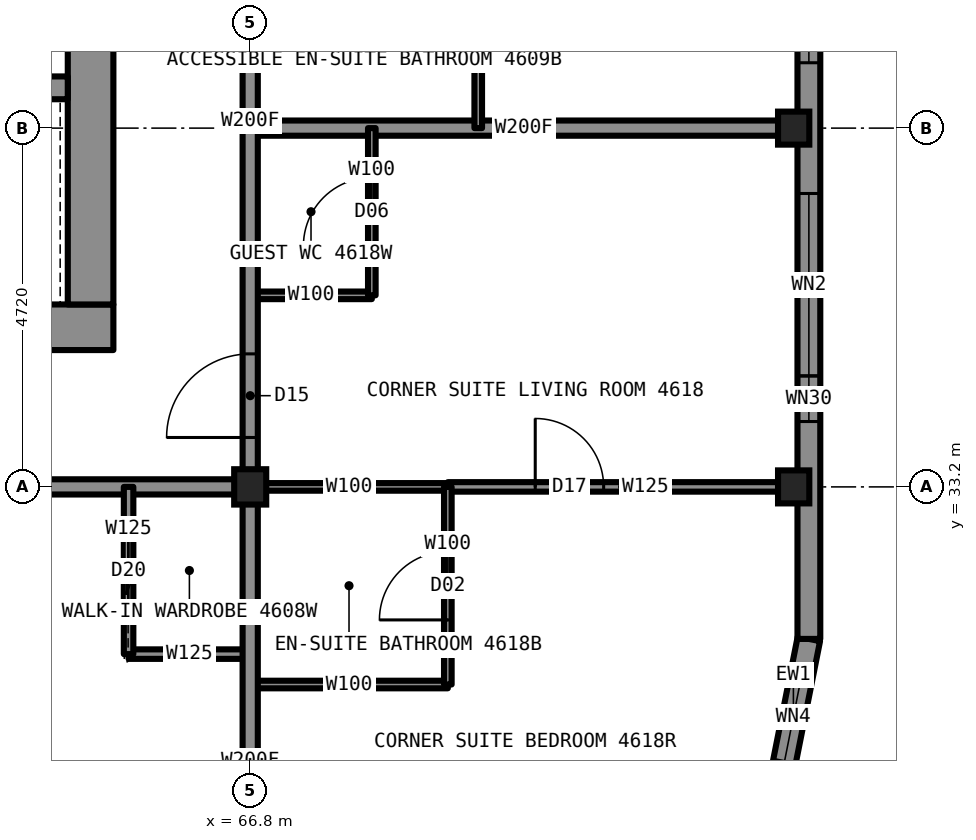
"""IFC4 building model, lengths in metres.
Left out: names, types, materials, properties, quantities, classifications, styles, units other than length and angle.
Written with IfcOpenShell. Run it as: python <this file> out.ifc"""

import sys

from ifc_helpers import new_model, si_unit, direction, frame, frame_2d, origin, origin_2d, place, context, subcontext, project, spatial, rectangle, i_section, extrude, element, fill, save


model = new_model("IFC4")
c1 = context("Model", 3, precision=1e-05, world=origin(), true_north=direction((0.0, 1.0)))
c2 = subcontext(c1, "Body", "Model", "MODEL_VIEW")
j1 = project(units=[si_unit("LENGTHUNIT", "METRE"), si_unit("PLANEANGLEUNIT", "RADIAN")], contexts=[c1])
p1 = place(None, origin())
s1 = spatial("IfcSite", under=j1, at=p1, CompositionType="ELEMENT")
p2 = place(p1, origin())
s2 = spatial("IfcBuilding", under=s1, at=p2, CompositionType="ELEMENT")
p3 = place(p2, frame((0.0, 0.0, 172.3)))
s3 = spatial("IfcBuildingStorey", under=s2, at=p3, CompositionType="ELEMENT", Elevation=172.3)
for number, where, z_axis, x_axis in (
    (1, (73.95, 33.2, 0.0), (0.0, 0.0, 1.0), (1.0, 0.0, 0.0)),
    (2, (73.95, 37.92, 0.0), (0.0, 0.0, 1.0), (1.0, 0.0, 0.0)),
):
    element("IfcColumn", number, at=place(p3, frame(where, z_axis=z_axis, x_axis=x_axis)), inside=s3, PredefinedType="COLUMN", context=c2, shape_type="SweptSolid", body=[
        extrude(i_section(OverallWidth=0.411, OverallDepth=0.434, WebThickness=0.036, FlangeThickness=0.057, at=origin_2d()), origin(), (0.0, 0.0, 1.0), 3.5),
    ])
p4 = place(p3, frame((66.8, 33.2, 0.0), z_axis=(0.0, 0.0, 1.0), x_axis=(1.0, 0.0, 0.0)))
e3 = element("IfcColumn", 3, at=p4, inside=s3, PredefinedType="COLUMN", context=c2, shape_type="SweptSolid", body=[
    extrude(i_section(OverallWidth=0.422, OverallDepth=0.465, WebThickness=0.045, FlangeThickness=0.073, at=origin_2d()), origin(), (0.0, 0.0, 1.0), 3.5),
])
p5 = place(p3, frame((45.0, 35.3, 0.0), z_axis=(0.0, 0.0, 1.0), x_axis=(1.0, 0.0, 0.0)))
e4 = element("IfcWall", 4, at=p5, inside=s3, PredefinedType="SHEAR", context=c2, shape_type="SweptSolid", body=[
    extrude(rectangle(XDim=20.0, YDim=0.6, at=frame_2d((10.0, 0.0))), origin(), (0.0, 0.0, 1.0), 3.5),
])
p6 = place(p3, frame((64.7, 35.6, 0.0), z_axis=(0.0, 0.0, 1.0), x_axis=(0.0, 1.0, 0.0)))
e5 = element("IfcWall", 5, at=p6, inside=s3, PredefinedType="SHEAR", context=c2, shape_type="SweptSolid", body=[
    extrude(rectangle(XDim=18.8, YDim=0.6, at=frame_2d((9.4, 0.0))), origin(), (0.0, 0.0, 1.0), 3.5),
])
p7 = place(p6, frame((13.4, 0.0, 0.0)))
e6 = element("IfcOpeningElement", 6, at=p7, cuts=e5, PredefinedType="OPENING", context=c2, shape_type="SweptSolid", body=[
    extrude(rectangle(XDim=1.8, YDim=2.2, at=frame_2d((0.9, 1.1))), frame((0.0, 0.31, 0.0), z_axis=(0.0, -1.0, 0.0), x_axis=(1.0, 0.0, 0.0)), (0.0, 0.0, 1.0), 0.62),
])
p8 = place(p6, frame((3.6, 0.0, 0.0)))
e7 = element("IfcOpeningElement", 7, at=p8, cuts=e5, PredefinedType="OPENING", context=c2, shape_type="SweptSolid", body=[
    extrude(rectangle(XDim=1.8, YDim=2.2, at=frame_2d((0.9, 1.1))), frame((0.0, 0.31, 0.0), z_axis=(0.0, -1.0, 0.0), x_axis=(1.0, 0.0, 0.0)), (0.0, 0.0, 1.0), 0.62),
])
p9 = place(p3, frame((45.6, 38.45, 0.0), z_axis=(0.0, 0.0, 1.0), x_axis=(1.0, 0.0, 0.0)))
e8 = element("IfcWall", 8, at=p9, inside=s3, PredefinedType="SHEAR", context=c2, shape_type="SweptSolid", body=[
    extrude(rectangle(XDim=18.8, YDim=0.3, at=frame_2d((9.4, 0.0))), origin(), (0.0, 0.0, 1.0), 3.5),
])
p10 = place(p9, frame((0.7, 0.0, 0.0)))
e9 = element("IfcOpeningElement", 9, at=p10, cuts=e8, PredefinedType="OPENING", context=c2, shape_type="SweptSolid", body=[
    extrude(rectangle(XDim=1.1, YDim=2.2, at=frame_2d((0.55, 1.1))), frame((0.0, 0.16, 0.0), z_axis=(0.0, -1.0, 0.0), x_axis=(1.0, 0.0, 0.0)), (0.0, 0.0, 1.0), 0.32),
])
p11 = place(p9, frame((3.4, 0.0, 0.0)))
e10 = element("IfcOpeningElement", 10, at=p11, cuts=e8, PredefinedType="OPENING", context=c2, shape_type="SweptSolid", body=[
    extrude(rectangle(XDim=1.1, YDim=2.2, at=frame_2d((0.55, 1.1))), frame((0.0, 0.16, 0.0), z_axis=(0.0, -1.0, 0.0), x_axis=(1.0, 0.0, 0.0)), (0.0, 0.0, 1.0), 0.32),
])
p12 = place(p9, frame((6.1, 0.0, 0.0)))
e11 = element("IfcOpeningElement", 11, at=p12, cuts=e8, PredefinedType="OPENING", context=c2, shape_type="SweptSolid", body=[
    extrude(rectangle(XDim=1.1, YDim=2.2, at=frame_2d((0.55, 1.1))), frame((0.0, 0.16, 0.0), z_axis=(0.0, -1.0, 0.0), x_axis=(1.0, 0.0, 0.0)), (0.0, 0.0, 1.0), 0.32),
])
p13 = place(p9, frame((8.8, 0.0, 0.0)))
e12 = element("IfcOpeningElement", 12, at=p13, cuts=e8, PredefinedType="OPENING", context=c2, shape_type="SweptSolid", body=[
    extrude(rectangle(XDim=1.1, YDim=2.2, at=frame_2d((0.55, 1.1))), frame((0.0, 0.16, 0.0), z_axis=(0.0, -1.0, 0.0), x_axis=(1.0, 0.0, 0.0)), (0.0, 0.0, 1.0), 0.32),
])
p14 = place(p3, frame((66.8, 33.2, 0.0), z_axis=(0.0, 0.0, 1.0), x_axis=(1.0, 0.0, 0.0)))
e13 = element("IfcWall", 13, at=p14, inside=s3, PredefinedType="PARTITIONING", context=c2, shape_type="SweptSolid", body=[
    extrude(rectangle(XDim=2.6, YDim=0.1, at=frame_2d((1.3, 0.0))), origin(), (0.0, 0.0, 1.0), 2.573),
])
p15 = place(p3, frame((43.2, 33.2, 0.0), z_axis=(0.0, 0.0, 1.0), x_axis=(1.0, 0.0, 0.0)))
e14 = element("IfcWall", 14, at=p15, inside=s3, PredefinedType="PARTITIONING", context=c2, shape_type="SweptSolid", body=[
    extrude(rectangle(XDim=23.6, YDim=0.2, at=frame_2d((11.8, 0.0))), origin(), (0.0, 0.0, 1.0), 3.33),
])
p16 = place(p15, frame((1.46, 0.0, 0.0)))
e15 = element("IfcOpeningElement", 15, at=p16, cuts=e14, PredefinedType="OPENING", context=c2, shape_type="SweptSolid", body=[
    extrude(rectangle(XDim=1.0, YDim=2.2, at=frame_2d((0.5, 1.1))), frame((0.0, 0.11, 0.0), z_axis=(0.0, -1.0, 0.0), x_axis=(1.0, 0.0, 0.0)), (0.0, 0.0, 1.0), 0.22),
])
p17 = place(p15, frame((7.72, 0.0, 0.0)))
e16 = element("IfcOpeningElement", 16, at=p17, cuts=e14, PredefinedType="OPENING", context=c2, shape_type="SweptSolid", body=[
    extrude(rectangle(XDim=1.0, YDim=2.2, at=frame_2d((0.5, 1.1))), frame((0.0, 0.11, 0.0), z_axis=(0.0, -1.0, 0.0), x_axis=(1.0, 0.0, 0.0)), (0.0, 0.0, 1.0), 0.22),
])
p18 = place(p15, frame((17.16, 0.0, 0.0)))
e17 = element("IfcOpeningElement", 17, at=p18, cuts=e14, PredefinedType="OPENING", context=c2, shape_type="SweptSolid", body=[
    extrude(rectangle(XDim=1.0, YDim=2.2, at=frame_2d((0.5, 1.1))), frame((0.0, 0.11, 0.0), z_axis=(0.0, -1.0, 0.0), x_axis=(1.0, 0.0, 0.0)), (0.0, 0.0, 1.0), 0.22),
])
p19 = place(p3, frame((69.4, 33.2, 0.0), z_axis=(0.0, 0.0, 1.0), x_axis=(1.0, 0.0, 0.0)))
e18 = element("IfcWall", 18, at=p19, inside=s3, PredefinedType="PARTITIONING", context=c2, shape_type="SweptSolid", body=[
    extrude(rectangle(XDim=4.6, YDim=0.125, at=frame_2d((2.3, 0.0))), origin(), (0.0, 0.0, 1.0), 2.573),
])
p20 = place(p19, frame((1.15, 0.0, 0.0)))
e19 = element("IfcOpeningElement", 19, at=p20, cuts=e18, PredefinedType="OPENING", context=c2, shape_type="SweptSolid", body=[
    extrude(rectangle(XDim=0.9, YDim=2.2, at=frame_2d((0.45, 1.1))), frame((0.0, 0.073, 0.0), z_axis=(0.0, -1.0, 0.0), x_axis=(1.0, 0.0, 0.0)), (0.0, 0.0, 1.0), 0.145),
])
p21 = place(p3, frame((65.2, 31.0, 0.0), z_axis=(0.0, 0.0, 1.0), x_axis=(1.0, 0.0, 0.0)))
e20 = element("IfcWall", 20, at=p21, inside=s3, PredefinedType="PARTITIONING", context=c2, shape_type="SweptSolid", body=[
    extrude(rectangle(XDim=1.6, YDim=0.125, at=frame_2d((0.8, 0.0))), origin(), (0.0, 0.0, 1.0), 3.33),
])
p22 = place(p3, frame((66.8, 30.6, 0.0), z_axis=(0.0, 0.0, 1.0), x_axis=(1.0, 0.0, 0.0)))
e21 = element("IfcWall", 21, at=p22, inside=s3, PredefinedType="PARTITIONING", context=c2, shape_type="SweptSolid", body=[
    extrude(rectangle(XDim=2.6, YDim=0.1, at=frame_2d((1.3, 0.0))), origin(), (0.0, 0.0, 1.0), 3.33),
])
p23 = place(p3, frame((66.8, 37.92, 0.0), z_axis=(0.0, 0.0, 1.0), x_axis=(1.0, 0.0, 0.0)))
e22 = element("IfcWall", 22, at=p23, inside=s3, PredefinedType="PARTITIONING", context=c2, shape_type="SweptSolid", body=[
    extrude(rectangle(XDim=7.2, YDim=0.2, at=frame_2d((3.6, 0.0))), origin(), (0.0, 0.0, 1.0), 2.573),
])
p24 = place(p3, frame((66.8, 35.72, 0.0), z_axis=(0.0, 0.0, 1.0), x_axis=(1.0, 0.0, 0.0)))
e23 = element("IfcWall", 23, at=p24, inside=s3, PredefinedType="PARTITIONING", context=c2, shape_type="SweptSolid", body=[
    extrude(rectangle(XDim=1.6, YDim=0.1, at=frame_2d((0.8, 0.0))), origin(), (0.0, 0.0, 1.0), 3.33),
])
p25 = place(p3, frame((65.2, 31.0, 0.0), z_axis=(0.0, 0.0, 1.0), x_axis=(0.0, 1.0, 0.0)))
e24 = element("IfcWall", 24, at=p25, inside=s3, PredefinedType="PARTITIONING", context=c2, shape_type="SweptSolid", body=[
    extrude(rectangle(XDim=2.2, YDim=0.125, at=frame_2d((1.1, 0.0))), origin(), (0.0, 0.0, 1.0), 3.33),
])
p26 = place(p25, frame((0.7, 0.0, 0.0)))
e25 = element("IfcOpeningElement", 25, at=p26, cuts=e24, PredefinedType="OPENING", context=c2, shape_type="SweptSolid", body=[
    extrude(rectangle(XDim=0.8, YDim=2.1, at=frame_2d((0.4, 1.05))), frame((0.0, 0.073, 0.0), z_axis=(0.0, -1.0, 0.0), x_axis=(1.0, 0.0, 0.0)), (0.0, 0.0, 1.0), 0.145),
])
p27 = place(p3, frame((66.8, 33.2, 0.0), z_axis=(0.0, 0.0, 1.0), x_axis=(0.0, 1.0, 0.0)))
e26 = element("IfcWall", 26, at=p27, inside=s3, PredefinedType="PARTITIONING", context=c2, shape_type="SweptSolid", body=[
    extrude(rectangle(XDim=23.58, YDim=0.2, at=frame_2d((11.79, 0.0))), origin(), (0.0, 0.0, 1.0), 3.33),
])
p28 = place(p27, frame((7.87, 0.0, 0.0)))
e27 = element("IfcOpeningElement", 27, at=p28, cuts=e26, PredefinedType="OPENING", context=c2, shape_type="SweptSolid", body=[
    extrude(rectangle(XDim=1.0, YDim=2.2, at=frame_2d((0.5, 1.1))), frame((0.0, 0.11, 0.0), z_axis=(0.0, -1.0, 0.0), x_axis=(1.0, 0.0, 0.0)), (0.0, 0.0, 1.0), 0.22),
])
p29 = place(p27, frame((10.9, 0.0, 0.0)))
e28 = element("IfcOpeningElement", 28, at=p29, cuts=e26, PredefinedType="OPENING", context=c2, shape_type="SweptSolid", body=[
    extrude(rectangle(XDim=1.0, YDim=2.2, at=frame_2d((0.5, 1.1))), frame((0.0, 0.11, 0.0), z_axis=(0.0, -1.0, 0.0), x_axis=(1.0, 0.0, 0.0)), (0.0, 0.0, 1.0), 0.22),
])
p30 = place(p27, frame((16.42, 0.0, 0.0)))
e29 = element("IfcOpeningElement", 29, at=p30, cuts=e26, PredefinedType="OPENING", context=c2, shape_type="SweptSolid", body=[
    extrude(rectangle(XDim=1.0, YDim=2.2, at=frame_2d((0.5, 1.1))), frame((0.0, 0.11, 0.0), z_axis=(0.0, -1.0, 0.0), x_axis=(1.0, 0.0, 0.0)), (0.0, 0.0, 1.0), 0.22),
])
p31 = place(p27, frame((22.05, 0.0, 0.0)))
e30 = element("IfcOpeningElement", 30, at=p31, cuts=e26, PredefinedType="OPENING", context=c2, shape_type="SweptSolid", body=[
    extrude(rectangle(XDim=1.1, YDim=2.2, at=frame_2d((0.55, 1.1))), frame((0.0, 0.11, 0.0), z_axis=(0.0, -1.0, 0.0), x_axis=(1.0, 0.0, 0.0)), (0.0, 0.0, 1.0), 0.22),
])
p32 = place(p27, frame((0.65, 0.0, 0.0)))
e31 = element("IfcOpeningElement", 31, at=p32, cuts=e26, PredefinedType="OPENING", context=c2, shape_type="SweptSolid", body=[
    extrude(rectangle(XDim=1.1, YDim=2.2, at=frame_2d((0.55, 1.1))), frame((0.0, 0.11, 0.0), z_axis=(0.0, -1.0, 0.0), x_axis=(1.0, 0.0, 0.0)), (0.0, 0.0, 1.0), 0.22),
])
p33 = place(p3, frame((66.8, 26.0, 0.0), z_axis=(0.0, 0.0, 1.0), x_axis=(0.0, 1.0, 0.0)))
e32 = element("IfcWall", 32, at=p33, inside=s3, PredefinedType="PARTITIONING", context=c2, shape_type="SweptSolid", body=[
    extrude(rectangle(XDim=7.2, YDim=0.2, at=frame_2d((3.6, 0.0))), origin(), (0.0, 0.0, 1.0), 2.573),
])
p34 = place(p3, frame((68.4, 35.72, 0.0), z_axis=(0.0, 0.0, 1.0), x_axis=(0.0, 1.0, 0.0)))
e33 = element("IfcWall", 33, at=p34, inside=s3, PredefinedType="PARTITIONING", context=c2, shape_type="SweptSolid", body=[
    extrude(rectangle(XDim=2.2, YDim=0.1, at=frame_2d((1.1, 0.0))), origin(), (0.0, 0.0, 1.0), 3.33),
])
p35 = place(p34, frame((0.65, 0.0, 0.0)))
e34 = element("IfcOpeningElement", 34, at=p35, cuts=e33, PredefinedType="OPENING", context=c2, shape_type="SweptSolid", body=[
    extrude(rectangle(XDim=0.9, YDim=2.1, at=frame_2d((0.45, 1.05))), frame((0.0, 0.06, 0.0), z_axis=(0.0, -1.0, 0.0), x_axis=(1.0, 0.0, 0.0)), (0.0, 0.0, 1.0), 0.12),
])
p36 = place(p3, frame((69.4, 30.6, 0.0), z_axis=(0.0, 0.0, 1.0), x_axis=(0.0, 1.0, 0.0)))
e35 = element("IfcWall", 35, at=p36, inside=s3, PredefinedType="PARTITIONING", context=c2, shape_type="SweptSolid", body=[
    extrude(rectangle(XDim=2.6, YDim=0.1, at=frame_2d((1.3, 0.0))), origin(), (0.0, 0.0, 1.0), 3.33),
])
p37 = place(p36, frame((0.85, 0.0, 0.0)))
e36 = element("IfcOpeningElement", 36, at=p37, cuts=e35, PredefinedType="OPENING", context=c2, shape_type="SweptSolid", body=[
    extrude(rectangle(XDim=0.9, YDim=2.1, at=frame_2d((0.45, 1.05))), frame((0.0, 0.06, 0.0), z_axis=(0.0, -1.0, 0.0), x_axis=(1.0, 0.0, 0.0)), (0.0, 0.0, 1.0), 0.12),
])
p38 = place(p3, frame((69.8, 37.92, 0.0), z_axis=(0.0, 0.0, 1.0), x_axis=(0.0, 1.0, 0.0)))
e37 = element("IfcWall", 37, at=p38, inside=s3, PredefinedType="PARTITIONING", context=c2, shape_type="SweptSolid", body=[
    extrude(rectangle(XDim=2.9, YDim=0.1, at=frame_2d((1.45, 0.0))), origin(), (0.0, 0.0, 1.0), 3.33),
])
p39 = place(p3, frame((73.743, 29.153, 0.0), z_axis=(0.0, 0.0, 1.0), x_axis=(0.195081421501, 0.980787050784, 0.0)))
e38 = element("IfcWall", 38, at=p39, inside=s3, PredefinedType="SOLIDWALL", context=c2, shape_type="SweptSolid", body=[
    extrude(rectangle(XDim=2.087, YDim=0.3, at=frame_2d((1.044, 0.0))), origin(), (0.0, 0.0, 1.0), 3.33),
])
p40 = place(p39, frame((0.444, 0.0, 0.3)))
e39 = element("IfcOpeningElement", 39, at=p40, cuts=e38, PredefinedType="OPENING", context=c2, shape_type="SweptSolid", body=[
    extrude(rectangle(XDim=1.2, YDim=2.0, at=frame_2d((0.6, 1.0))), frame((0.0, 0.16, 0.0), z_axis=(0.0, -1.0, 0.0), x_axis=(1.0, 0.0, 0.0)), (0.0, 0.0, 1.0), 0.32),
])
p41 = place(p3, frame((74.15, 31.2, 0.0), z_axis=(0.0, 0.0, 1.0), x_axis=(0.0, 1.0, 0.0)))
e40 = element("IfcWall", 40, at=p41, inside=s3, PredefinedType="SOLIDWALL", context=c2, shape_type="SweptSolid", body=[
    extrude(rectangle(XDim=27.6, YDim=0.3, at=frame_2d((13.8, 0.0))), origin(), (0.0, 0.0, 1.0), 2.83),
])
p42 = place(p41, frame((3.46, 0.0, 0.3)))
e41 = element("IfcOpeningElement", 41, at=p42, cuts=e40, PredefinedType="OPENING", context=c2, shape_type="SweptSolid", body=[
    extrude(rectangle(XDim=2.4, YDim=2.0, at=frame_2d((1.2, 1.0))), frame((0.0, 0.16, 0.0), z_axis=(0.0, -1.0, 0.0), x_axis=(1.0, 0.0, 0.0)), (0.0, 0.0, 1.0), 0.32),
])
p43 = place(p41, frame((7.58, 0.0, 0.3)))
e42 = element("IfcOpeningElement", 42, at=p43, cuts=e40, PredefinedType="OPENING", context=c2, shape_type="SweptSolid", body=[
    extrude(rectangle(XDim=3.0, YDim=2.0, at=frame_2d((1.5, 1.0))), frame((0.0, 0.16, 0.0), z_axis=(0.0, -1.0, 0.0), x_axis=(1.0, 0.0, 0.0)), (0.0, 0.0, 1.0), 0.32),
])
p44 = place(p41, frame((12.3, 0.0, 0.3)))
e43 = element("IfcOpeningElement", 43, at=p44, cuts=e40, PredefinedType="OPENING", context=c2, shape_type="SweptSolid", body=[
    extrude(rectangle(XDim=3.0, YDim=2.0, at=frame_2d((1.5, 1.0))), frame((0.0, 0.16, 0.0), z_axis=(0.0, -1.0, 0.0), x_axis=(1.0, 0.0, 0.0)), (0.0, 0.0, 1.0), 0.32),
])
p45 = place(p41, frame((17.02, 0.0, 0.3)))
e44 = element("IfcOpeningElement", 44, at=p45, cuts=e40, PredefinedType="OPENING", context=c2, shape_type="SweptSolid", body=[
    extrude(rectangle(XDim=3.0, YDim=2.0, at=frame_2d((1.5, 1.0))), frame((0.0, 0.16, 0.0), z_axis=(0.0, -1.0, 0.0), x_axis=(1.0, 0.0, 0.0)), (0.0, 0.0, 1.0), 0.32),
])
p46 = place(p41, frame((21.74, 0.0, 0.3)))
e45 = element("IfcOpeningElement", 45, at=p46, cuts=e40, PredefinedType="OPENING", context=c2, shape_type="SweptSolid", body=[
    extrude(rectangle(XDim=2.4, YDim=2.0, at=frame_2d((1.2, 1.0))), frame((0.0, 0.16, 0.0), z_axis=(0.0, -1.0, 0.0), x_axis=(1.0, 0.0, 0.0)), (0.0, 0.0, 1.0), 0.32),
])
p47 = place(p41, frame((2.86, 0.0, 0.3)))
e46 = element("IfcOpeningElement", 46, at=p47, cuts=e40, PredefinedType="OPENING", context=c2, shape_type="SweptSolid", body=[
    extrude(rectangle(XDim=0.6, YDim=1.1, at=frame_2d((0.3, 0.55))), frame((0.0, 0.16, 0.0), z_axis=(0.0, -1.0, 0.0), x_axis=(1.0, 0.0, 0.0)), (0.0, 0.0, 1.0), 0.32),
])
p48 = place(p41, frame((24.14, 0.0, 0.3)))
e47 = element("IfcOpeningElement", 47, at=p48, cuts=e40, PredefinedType="OPENING", context=c2, shape_type="SweptSolid", body=[
    extrude(rectangle(XDim=0.6, YDim=1.1, at=frame_2d((0.3, 0.55))), frame((0.0, 0.16, 0.0), z_axis=(0.0, -1.0, 0.0), x_axis=(1.0, 0.0, 0.0)), (0.0, 0.0, 1.0), 0.32),
])
p49 = place(p26, origin())
e48 = element("IfcDoor", 48, at=p49, inside=s3, OperationType="SLIDING_TO_LEFT", PredefinedType="DOOR", context=c2, shape_type="SweptSolid", body=[
    extrude(rectangle(XDim=0.8, YDim=2.1, at=frame_2d((0.4, 1.05))), frame((0.0, 0.025, 0.0), z_axis=(0.0, -1.0, 0.0), x_axis=(1.0, 0.0, 0.0)), (0.0, 0.0, 1.0), 0.05),
])
fill(e25, e48)
p50 = place(p32, origin())
e49 = element("IfcDoor", 49, at=p50, inside=s3, OperationType="SINGLE_SWING_LEFT", PredefinedType="DOOR", context=c2, shape_type="SweptSolid", body=[
    extrude(rectangle(XDim=1.1, YDim=2.2, at=frame_2d((0.55, 1.1))), frame((0.0, 0.025, 0.0), z_axis=(0.0, -1.0, 0.0), x_axis=(1.0, 0.0, 0.0)), (0.0, 0.0, 1.0), 0.05),
])
fill(e31, e49)
p51 = place(p37, origin())
e50 = element("IfcDoor", 50, at=p51, inside=s3, OperationType="SINGLE_SWING_RIGHT", PredefinedType="DOOR", context=c2, shape_type="SweptSolid", body=[
    extrude(rectangle(XDim=0.9, YDim=2.1, at=frame_2d((0.45, 1.05))), frame((0.0, 0.025, 0.0), z_axis=(0.0, -1.0, 0.0), x_axis=(1.0, 0.0, 0.0)), (0.0, 0.0, 1.0), 0.05),
])
fill(e36, e50)
p52 = place(p20, origin())
e51 = element("IfcDoor", 51, at=p52, inside=s3, OperationType="SINGLE_SWING_LEFT", PredefinedType="DOOR", context=c2, shape_type="SweptSolid", body=[
    extrude(rectangle(XDim=0.9, YDim=2.2, at=frame_2d((0.45, 1.1))), frame((0.0, 0.025, 0.0), z_axis=(0.0, -1.0, 0.0), x_axis=(1.0, 0.0, 0.0)), (0.0, 0.0, 1.0), 0.05),
])
fill(e19, e51)
p53 = place(p35, origin())
e52 = element("IfcDoor", 52, at=p53, inside=s3, OperationType="SINGLE_SWING_LEFT", PredefinedType="DOOR", context=c2, shape_type="SweptSolid", body=[
    extrude(rectangle(XDim=0.9, YDim=2.1, at=frame_2d((0.45, 1.05))), frame((0.0, 0.025, 0.0), z_axis=(0.0, -1.0, 0.0), x_axis=(1.0, 0.0, 0.0)), (0.0, 0.0, 1.0), 0.05),
])
fill(e34, e52)
p54 = place(p40, origin())
e53 = element("IfcWindow", 53, at=p54, inside=s3, PartitioningType="SINGLE_PANEL", PredefinedType="WINDOW", context=c2, shape_type="SweptSolid", body=[
    extrude(rectangle(XDim=1.2, YDim=2.0, at=frame_2d((0.6, 1.0))), frame((0.0, 0.13, 0.0), z_axis=(0.0, -1.0, 0.0), x_axis=(1.0, 0.0, 0.0)), (0.0, 0.0, 1.0), 0.06),
])
fill(e39, e53)
p55 = place(p42, origin())
e54 = element("IfcWindow", 54, at=p55, inside=s3, PartitioningType="SINGLE_PANEL", PredefinedType="WINDOW", context=c2, shape_type="SweptSolid", body=[
    extrude(rectangle(XDim=2.4, YDim=2.0, at=frame_2d((1.2, 1.0))), frame((0.0, 0.13, 0.0), z_axis=(0.0, -1.0, 0.0), x_axis=(1.0, 0.0, 0.0)), (0.0, 0.0, 1.0), 0.06),
])
fill(e41, e54)
p56 = place(p43, origin())
e55 = element("IfcWindow", 55, at=p56, inside=s3, PartitioningType="SINGLE_PANEL", PredefinedType="WINDOW", context=c2, shape_type="SweptSolid", body=[
    extrude(rectangle(XDim=3.0, YDim=2.0, at=frame_2d((1.5, 1.0))), frame((0.0, 0.13, 0.0), z_axis=(0.0, -1.0, 0.0), x_axis=(1.0, 0.0, 0.0)), (0.0, 0.0, 1.0), 0.06),
])
fill(e42, e55)
p57 = place(p47, origin())
e56 = element("IfcWindow", 56, at=p57, inside=s3, PartitioningType="SINGLE_PANEL", PredefinedType="WINDOW", context=c2, shape_type="SweptSolid", body=[
    extrude(rectangle(XDim=0.6, YDim=1.1, at=frame_2d((0.3, 0.55))), frame((0.0, 0.13, 0.0), z_axis=(0.0, -1.0, 0.0), x_axis=(1.0, 0.0, 0.0)), (0.0, 0.0, 1.0), 0.06),
])
fill(e46, e56)
save(model, sys.argv[1])
